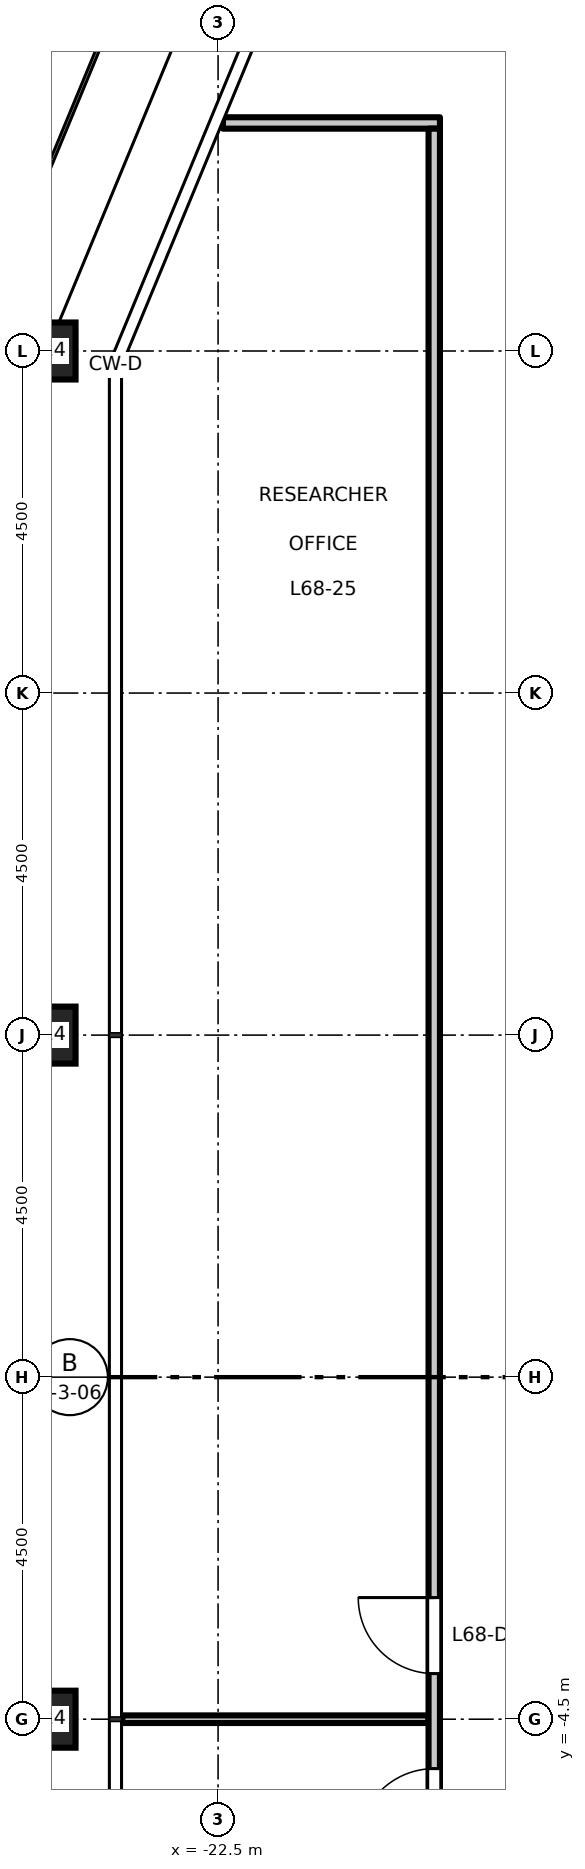
"""IFC4 building model, lengths in metres.
Left out: names, types, materials, properties, quantities, classifications, styles, units other than length and angle.
Written with IfcOpenShell. Run it as: python <this file> out.ifc"""

import sys

from ifc_helpers import new_model, si_unit, direction, frame, frame_2d, origin, origin_2d, place, context, subcontext, project, spatial, rectangle, hollow_rectangle, extrude, element, fill, save


model = new_model("IFC4")
c1 = context("Model", 3, precision=1e-05, world=origin(), true_north=direction((0.0, 1.0)))
c2 = subcontext(c1, "Body", "Model", "MODEL_VIEW")
j1 = project(units=[si_unit("LENGTHUNIT", "METRE"), si_unit("PLANEANGLEUNIT", "RADIAN")], contexts=[c1])
p1 = place(None, origin())
s1 = spatial("IfcSite", under=j1, at=p1, CompositionType="ELEMENT")
p2 = place(p1, origin())
s2 = spatial("IfcBuilding", under=s1, at=p2, CompositionType="ELEMENT")
p3 = place(p2, frame((0.0, 0.0, 316.7)))
s3 = spatial("IfcBuildingStorey", under=s2, at=p3, CompositionType="ELEMENT", Elevation=316.7)
for number, where, z_axis, x_axis in (
    (1, (-24.75, 13.5, 0.0), (0.0, 0.0, 1.0), (1.0, 0.0, 0.0)),
    (2, (-24.75, 4.5, 0.0), (0.0, 0.0, 1.0), (1.0, 0.0, 0.0)),
    (3, (-24.75, -4.5, 0.0), (0.0, 0.0, 1.0), (1.0, 0.0, 0.0)),
):
    element("IfcColumn", number, at=place(p3, frame(where, z_axis=z_axis, x_axis=x_axis)), inside=s3, PredefinedType="COLUMN", context=c2, shape_type="SweptSolid", body=[
        extrude(hollow_rectangle(XDim=0.75, YDim=0.75, WallThickness=0.04, at=origin_2d()), origin(), (0.0, 0.0, 1.0), 4.5),
    ])
p4 = place(p3, frame((-23.76, -4.5, 0.0), z_axis=(0.0, 0.0, 1.0), x_axis=(1.0, 0.0, 0.0)))
e4 = element("IfcWall", 4, at=p4, inside=s3, PredefinedType="PARTITIONING", context=c2, shape_type="SweptSolid", body=[
    extrude(rectangle(XDim=4.029, YDim=0.1, at=frame_2d((2.015, 0.0))), origin(), (0.0, 0.0, 1.0), 4.35),
])
p5 = place(p3, frame((-22.436, 16.5, 0.0), z_axis=(0.0, 0.0, 1.0), x_axis=(1.0, 0.0, 0.0)))
e5 = element("IfcWall", 5, at=p5, inside=s3, PredefinedType="PARTITIONING", context=c2, shape_type="SweptSolid", body=[
    extrude(rectangle(XDim=2.855, YDim=0.15, at=frame_2d((1.427, 0.0))), origin(), (0.0, 0.0, 1.0), 4.35),
])
p6 = place(p3, frame((-19.656, -16.42, 0.0), z_axis=(0.0, 0.0, 1.0), x_axis=(0.0, 1.0, 0.0)))
e6 = element("IfcWall", 6, at=p6, inside=s3, PredefinedType="PARTITIONING", context=c2, shape_type="SweptSolid", body=[
    extrude(rectangle(XDim=32.845, YDim=0.15, at=frame_2d((16.422, 0.0))), origin(), (0.0, 0.0, 1.0), 4.35),
])
p7 = place(p6, frame((0.52, 0.0, 0.0)))
e7 = element("IfcOpeningElement", 7, at=p7, cuts=e6, PredefinedType="OPENING", context=c2, shape_type="SweptSolid", body=[
    extrude(rectangle(XDim=1.0, YDim=2.1, at=frame_2d((0.5, 1.05))), frame((0.0, 0.085, 0.0), z_axis=(0.0, -1.0, 0.0), x_axis=(1.0, 0.0, 0.0)), (0.0, 0.0, 1.0), 0.17),
])
p8 = place(p6, frame((10.27, 0.0, 0.0)))
e8 = element("IfcOpeningElement", 8, at=p8, cuts=e6, PredefinedType="OPENING", context=c2, shape_type="SweptSolid", body=[
    extrude(rectangle(XDim=1.0, YDim=2.1, at=frame_2d((0.5, 1.05))), frame((0.0, 0.085, 0.0), z_axis=(0.0, -1.0, 0.0), x_axis=(1.0, 0.0, 0.0)), (0.0, 0.0, 1.0), 0.17),
])
p9 = place(p6, frame((12.52, 0.0, 0.0)))
e9 = element("IfcOpeningElement", 9, at=p9, cuts=e6, PredefinedType="OPENING", context=c2, shape_type="SweptSolid", body=[
    extrude(rectangle(XDim=1.0, YDim=2.1, at=frame_2d((0.5, 1.05))), frame((0.0, 0.085, 0.0), z_axis=(0.0, -1.0, 0.0), x_axis=(1.0, 0.0, 0.0)), (0.0, 0.0, 1.0), 0.17),
])
p10 = place(p8, origin())
e10 = element("IfcDoor", 10, at=p10, inside=s3, OperationType="SINGLE_SWING_LEFT", PredefinedType="DOOR", context=c2, shape_type="SweptSolid", body=[
    extrude(rectangle(XDim=1.0, YDim=2.1, at=frame_2d((0.5, 1.05))), frame((0.0, 0.025, 0.0), z_axis=(0.0, -1.0, 0.0), x_axis=(1.0, 0.0, 0.0)), (0.0, 0.0, 1.0), 0.05),
])
fill(e8, e10)
p11 = place(p9, origin())
e11 = element("IfcDoor", 11, at=p11, inside=s3, OperationType="SINGLE_SWING_RIGHT", PredefinedType="DOOR", context=c2, shape_type="SweptSolid", body=[
    extrude(rectangle(XDim=1.0, YDim=2.1, at=frame_2d((0.5, 1.05))), frame((0.0, 0.025, 0.0), z_axis=(0.0, -1.0, 0.0), x_axis=(1.0, 0.0, 0.0)), (0.0, 0.0, 1.0), 0.05),
])
fill(e9, e11)
save(model, sys.argv[1])
